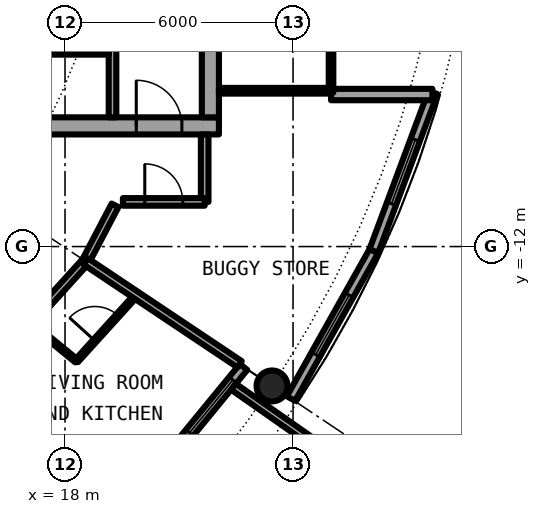
"""IFC4 building model, lengths in metres.
Left out: names, types, materials, properties, quantities, classifications, styles, units other than length and angle.
Written with IfcOpenShell. Run it as: python <this file> out.ifc"""

import sys

from ifc_helpers import new_model, si_unit, direction, frame, frame_2d, origin, origin_2d, place, context, subcontext, project, spatial, rectangle, hollow_circle, extrude, element, fill, save


model = new_model("IFC4")
c1 = context("Model", 3, precision=1e-05, world=origin(), true_north=direction((0.0, 1.0)))
c2 = subcontext(c1, "Body", "Model", "MODEL_VIEW")
j1 = project(units=[si_unit("LENGTHUNIT", "METRE"), si_unit("PLANEANGLEUNIT", "RADIAN")], contexts=[c1])
p1 = place(None, origin())
s1 = spatial("IfcSite", under=j1, at=p1, CompositionType="ELEMENT")
p2 = place(p1, origin())
s2 = spatial("IfcBuilding", under=s1, at=p2, CompositionType="ELEMENT")
p3 = place(p2, frame((0.0, 0.0, 212.7)))
s3 = spatial("IfcBuildingStorey", under=s2, at=p3, CompositionType="ELEMENT", Elevation=212.7)
p4 = place(p3, frame((23.448, -15.667, 0.0), z_axis=(0.0, 0.0, 1.0), x_axis=(1.0, 0.0, 0.0)))
e1 = element("IfcColumn", 1, at=p4, inside=s3, PredefinedType="COLUMN", context=c2, shape_type="SweptSolid", body=[
    extrude(hollow_circle(Radius=0.406, WallThickness=0.03, at=origin_2d()), origin(), (0.0, 0.0, 1.0), 3.05),
])
p5 = place(p3, frame((19.304, -19.304, 0.0), z_axis=(0.0, 0.0, 1.0), x_axis=(0.634382322723, 0.773019449054, 0.0)))
e2 = element("IfcWall", 2, at=p5, inside=s3, PredefinedType="SOLIDWALL", context=c2, shape_type="SweptSolid", body=[
    extrude(rectangle(XDim=5.352, YDim=0.25, at=frame_2d((2.676, 0.0))), origin(), (0.0, 0.0, 1.0), 2.7),
])
p6 = place(p5, frame((0.841, 0.0, 0.0)))
e3 = element("IfcOpeningElement", 3, at=p6, cuts=e2, PredefinedType="OPENING", context=c2, shape_type="SweptSolid", body=[
    extrude(rectangle(XDim=1.0, YDim=2.2, at=frame_2d((0.5, 1.1))), frame((0.0, 0.135, 0.0), z_axis=(0.0, -1.0, 0.0), x_axis=(1.0, 0.0, 0.0)), (0.0, 0.0, 1.0), 0.27),
])
p7 = place(p5, frame((3.111, 0.0, 0.3)))
e4 = element("IfcOpeningElement", 4, at=p7, cuts=e2, PredefinedType="OPENING", context=c2, shape_type="SweptSolid", body=[
    extrude(rectangle(XDim=1.8, YDim=2.1, at=frame_2d((0.9, 1.05))), frame((0.0, 0.135, 0.0), z_axis=(0.0, -1.0, 0.0), x_axis=(1.0, 0.0, 0.0)), (0.0, 0.0, 1.0), 0.27),
])
p8 = place(p3, frame((22.433, -15.688, -0.03), z_axis=(0.0, 0.0, 1.0), x_axis=(0.819373043115, -0.573260687834, 0.0)))
e5 = element("IfcWall", 5, at=p8, inside=s3, PredefinedType="SOLIDWALL", context=c2, shape_type="SweptSolid", body=[
    extrude(rectangle(XDim=2.925, YDim=0.2, at=frame_2d((1.463, 0.0))), origin(), (0.0, 0.0, 1.0), 2.73),
])
p9 = place(p3, frame((23.946, -16.0, 0.0), z_axis=(0.0, 0.0, 1.0), x_axis=(0.489696356642, 0.871893042919, 0.0)))
e6 = element("IfcWall", 6, at=p9, inside=s3, PredefinedType="SOLIDWALL", context=c2, shape_type="SweptSolid", body=[
    extrude(rectangle(XDim=4.454, YDim=0.25, at=frame_2d((2.227, 0.0))), origin(), (0.0, 0.0, 1.0), 2.7),
])
p10 = place(p9, frame((1.327, 0.0, 0.3)))
e7 = element("IfcOpeningElement", 7, at=p10, cuts=e6, PredefinedType="OPENING", context=c2, shape_type="SweptSolid", body=[
    extrude(rectangle(XDim=1.8, YDim=2.1, at=frame_2d((0.9, 1.05))), frame((0.0, 0.135, 0.0), z_axis=(0.0, -1.0, 0.0), x_axis=(1.0, 0.0, 0.0)), (0.0, 0.0, 1.0), 0.27),
])
p11 = place(p3, frame((26.127, -12.117, 0.0), z_axis=(0.0, 0.0, 1.0), x_axis=(0.349247811493, 0.937030397675, 0.0)))
e8 = element("IfcWall", 8, at=p11, inside=s3, PredefinedType="SOLIDWALL", context=c2, shape_type="SweptSolid", body=[
    extrude(rectangle(XDim=4.452, YDim=0.25, at=frame_2d((2.226, 0.0))), origin(), (0.0, 0.0, 1.0), 2.7),
])
p12 = place(p11, frame((1.327, 0.0, 0.3)))
e9 = element("IfcOpeningElement", 9, at=p12, cuts=e8, PredefinedType="OPENING", context=c2, shape_type="SweptSolid", body=[
    extrude(rectangle(XDim=1.8, YDim=2.1, at=frame_2d((0.9, 1.05))), frame((0.0, 0.135, 0.0), z_axis=(0.0, -1.0, 0.0), x_axis=(1.0, 0.0, 0.0)), (0.0, 0.0, 1.0), 0.27),
])
p13 = place(p3, frame((25.0, -8.0, 0.0), z_axis=(0.0, 0.0, 1.0), x_axis=(1.0, 0.0, 0.0)))
e10 = element("IfcWall", 10, at=p13, inside=s3, PredefinedType="SOLIDWALL", context=c2, shape_type="SweptSolid", body=[
    extrude(rectangle(XDim=2.667, YDim=0.3, at=frame_2d((1.333, 0.0))), origin(), (0.0, 0.0, 1.0), 2.7),
])
p14 = place(p3, frame((8.55, -8.825, 0.0), z_axis=(0.0, 0.0, 1.0), x_axis=(1.0, 0.0, 0.0)))
e11 = element("IfcWall", 11, at=p14, inside=s3, PredefinedType="SHEAR", context=c2, shape_type="SweptSolid", body=[
    extrude(rectangle(XDim=13.5, YDim=0.45, at=frame_2d((6.75, 0.0))), origin(), (0.0, 0.0, 1.0), 3.05),
])
p15 = place(p14, frame((11.325, 0.0, 0.0)))
e12 = element("IfcOpeningElement", 12, at=p15, cuts=e11, PredefinedType="OPENING", context=c2, shape_type="SweptSolid", body=[
    extrude(rectangle(XDim=1.2, YDim=2.3, at=frame_2d((0.6, 1.15))), frame((0.0, 0.235, 0.0), z_axis=(0.0, -1.0, 0.0), x_axis=(1.0, 0.0, 0.0)), (0.0, 0.0, 1.0), 0.47),
])
p16 = place(p3, frame((21.825, 8.6, 0.0), z_axis=(0.0, 0.0, 1.0), x_axis=(0.0, -1.0, 0.0)))
e13 = element("IfcWall", 13, at=p16, inside=s3, PredefinedType="SHEAR", context=c2, shape_type="SweptSolid", body=[
    extrude(rectangle(XDim=17.2, YDim=0.45, at=frame_2d((8.6, 0.0))), origin(), (0.0, 0.0, 1.0), 3.05),
])
p17 = place(p16, frame((7.7, 0.0, 0.0)))
e14 = element("IfcOpeningElement", 14, at=p17, cuts=e13, PredefinedType="OPENING", context=c2, shape_type="SweptSolid", body=[
    extrude(rectangle(XDim=1.8, YDim=2.3, at=frame_2d((0.9, 1.15))), frame((0.0, 0.235, 0.0), z_axis=(0.0, -1.0, 0.0), x_axis=(1.0, 0.0, 0.0)), (0.0, 0.0, 1.0), 0.47),
])
p18 = place(p3, frame((19.25, -8.6, 0.0), z_axis=(0.0, 0.0, 1.0), x_axis=(0.0, 1.0, 0.0)))
e15 = element("IfcWall", 15, at=p18, inside=s3, PredefinedType="SOLIDWALL", context=c2, shape_type="SweptSolid", body=[
    extrude(rectangle(XDim=7.025, YDim=0.2, at=frame_2d((3.513, 0.0))), origin(), (0.0, 0.0, 1.0), 2.7),
])
p19 = place(p18, frame((2.35, 0.0, 0.0)))
e16 = element("IfcOpeningElement", 16, at=p19, cuts=e15, PredefinedType="OPENING", context=c2, shape_type="SweptSolid", body=[
    extrude(rectangle(XDim=1.1, YDim=2.3, at=frame_2d((0.55, 1.15))), frame((0.0, 0.11, 0.0), z_axis=(0.0, -1.0, 0.0), x_axis=(1.0, 0.0, 0.0)), (0.0, 0.0, 1.0), 0.22),
])
p20 = place(p3, frame((15.45, -6.875, 0.0), z_axis=(0.0, 0.0, 1.0), x_axis=(1.0, 0.0, 0.0)))
e17 = element("IfcWall", 17, at=p20, inside=s3, PredefinedType="PARTITIONING", context=c2, shape_type="SweptSolid", body=[
    extrude(rectangle(XDim=3.7, YDim=0.15, at=frame_2d((1.85, 0.0))), origin(), (0.0, 0.0, 1.0), 2.7),
])
p21 = place(p20, frame((1.4, 0.0, 0.0)))
e18 = element("IfcOpeningElement", 18, at=p21, cuts=e17, PredefinedType="OPENING", context=c2, shape_type="SweptSolid", body=[
    extrude(rectangle(XDim=0.9, YDim=2.3, at=frame_2d((0.45, 1.15))), frame((0.0, 0.085, 0.0), z_axis=(0.0, -1.0, 0.0), x_axis=(1.0, 0.0, 0.0)), (0.0, 0.0, 1.0), 0.17),
])
p22 = place(p3, frame((22.05, -7.9, 0.0), z_axis=(0.0, 0.0, 1.0), x_axis=(1.0, 0.0, 0.0)))
e19 = element("IfcWall", 19, at=p22, inside=s3, PredefinedType="PARTITIONING", context=c2, shape_type="SweptSolid", body=[
    extrude(rectangle(XDim=2.89, YDim=0.15, at=frame_2d((1.445, 0.0))), origin(), (0.0, 0.0, 1.0), 2.7),
])
p23 = place(p3, frame((25.0, -7.95, 0.0), z_axis=(0.0, 0.0, 1.0), x_axis=(0.0, 1.0, 0.0)))
e20 = element("IfcWall", 20, at=p23, inside=s3, PredefinedType="PARTITIONING", context=c2, shape_type="SweptSolid", body=[
    extrude(rectangle(XDim=15.9, YDim=0.12, at=frame_2d((7.95, 0.0))), origin(), (0.0, 0.0, 1.0), 2.7),
])
p24 = place(p23, frame((0.95, 0.0, 0.1)))
e21 = element("IfcOpeningElement", 21, at=p24, cuts=e20, PredefinedType="OPENING", context=c2, shape_type="SweptSolid", body=[
    extrude(rectangle(XDim=14.0, YDim=2.35, at=frame_2d((7.0, 1.175))), frame((0.0, 0.07, 0.0), z_axis=(0.0, -1.0, 0.0), x_axis=(1.0, 0.0, 0.0)), (0.0, 0.0, 1.0), 0.14),
])
p25 = place(p3, frame((18.302, -15.01, 0.0), z_axis=(0.0, 0.0, 1.0), x_axis=(0.671637685376, 0.740879760544, 0.0)))
e22 = element("IfcWall", 22, at=p25, inside=s3, PredefinedType="PARTITIONING", context=c2, shape_type="SweptSolid", body=[
    extrude(rectangle(XDim=2.338, YDim=0.1, at=frame_2d((1.169, 0.0))), origin(), (0.0, 0.0, 1.0), 2.7),
])
p26 = place(p25, frame((0.719, 0.0, 0.0)))
e23 = element("IfcOpeningElement", 23, at=p26, cuts=e22, PredefinedType="OPENING", context=c2, shape_type="SweptSolid", body=[
    extrude(rectangle(XDim=0.9, YDim=2.3, at=frame_2d((0.45, 1.15))), frame((0.0, 0.06, 0.0), z_axis=(0.0, -1.0, 0.0), x_axis=(1.0, 0.0, 0.0)), (0.0, 0.0, 1.0), 0.12),
])
p27 = place(p3, frame((18.542, -12.389, 0.0), z_axis=(0.0, 0.0, 1.0), x_axis=(0.465359652486, 0.885121683068, 0.0)))
e24 = element("IfcWall", 24, at=p27, inside=s3, PredefinedType="PARTITIONING", context=c2, shape_type="SweptSolid", body=[
    extrude(rectangle(XDim=1.665, YDim=0.2, at=frame_2d((0.833, 0.0))), origin(), (0.0, 0.0, 1.0), 2.7),
])
p28 = place(p3, frame((14.147, -17.238, 0.0), z_axis=(0.0, 0.0, 1.0), x_axis=(0.671561669125, 0.740948665268, 0.0)))
e25 = element("IfcWall", 25, at=p28, inside=s3, PredefinedType="PARTITIONING", context=c2, shape_type="SweptSolid", body=[
    extrude(rectangle(XDim=6.544, YDim=0.2, at=frame_2d((3.272, 0.0))), origin(), (0.0, 0.0, 1.0), 2.7),
])
p29 = place(p28, frame((1.682, 0.0, 0.0)))
e26 = element("IfcOpeningElement", 26, at=p29, cuts=e25, PredefinedType="OPENING", context=c2, shape_type="SweptSolid", body=[
    extrude(rectangle(XDim=1.0, YDim=2.3, at=frame_2d((0.5, 1.15))), frame((0.0, 0.11, 0.0), z_axis=(0.0, -1.0, 0.0), x_axis=(1.0, 0.0, 0.0)), (0.0, 0.0, 1.0), 0.22),
])
p30 = place(p3, frame((21.675, -10.825, 0.0), z_axis=(0.0, 0.0, 1.0), x_axis=(0.0, 1.0, 0.0)))
e27 = element("IfcWall", 27, at=p30, inside=s3, PredefinedType="PARTITIONING", context=c2, shape_type="SweptSolid", body=[
    extrude(rectangle(XDim=1.775, YDim=0.2, at=frame_2d((0.887, 0.0))), origin(), (0.0, 0.0, 1.0), 2.7),
])
p31 = place(p3, frame((19.523, -10.825, 0.0), z_axis=(0.0, 0.0, 1.0), x_axis=(1.0, 0.0, 0.0)))
e28 = element("IfcWall", 28, at=p31, inside=s3, PredefinedType="PARTITIONING", context=c2, shape_type="SweptSolid", body=[
    extrude(rectangle(XDim=2.152, YDim=0.2, at=frame_2d((1.076, 0.0))), origin(), (0.0, 0.0, 1.0), 2.7),
])
p32 = place(p31, frame((0.576, 0.0, 0.0)))
e29 = element("IfcOpeningElement", 29, at=p32, cuts=e28, PredefinedType="OPENING", context=c2, shape_type="SweptSolid", body=[
    extrude(rectangle(XDim=1.0, YDim=2.3, at=frame_2d((0.5, 1.15))), frame((0.0, 0.11, 0.0), z_axis=(0.0, -1.0, 0.0), x_axis=(1.0, 0.0, 0.0)), (0.0, 0.0, 1.0), 0.22),
])
p33 = place(p3, frame((17.077, -14.006, 0.0), z_axis=(0.0, 0.0, 1.0), x_axis=(0.773476341377, -0.633825172528, 0.0)))
e30 = element("IfcWall", 30, at=p33, inside=s3, PredefinedType="PARTITIONING", context=c2, shape_type="SweptSolid", body=[
    extrude(rectangle(XDim=1.584, YDim=0.1, at=frame_2d((0.792, 0.0))), origin(), (0.0, 0.0, 1.0), 2.7),
])
p34 = place(p3, frame((16.732, -16.743, 0.0), z_axis=(0.0, 0.0, 1.0), x_axis=(0.706967463531, -0.707246071398, 0.0)))
e31 = element("IfcWall", 31, at=p34, inside=s3, PredefinedType="PARTITIONING", context=c2, shape_type="SweptSolid", body=[
    extrude(rectangle(XDim=3.505, YDim=0.1, at=frame_2d((1.752, 0.0))), origin(), (0.0, 0.0, 1.0), 2.7),
])
p35 = place(p34, frame((1.303, 0.0, 0.0)))
e32 = element("IfcOpeningElement", 32, at=p35, cuts=e31, PredefinedType="OPENING", context=c2, shape_type="SweptSolid", body=[
    extrude(rectangle(XDim=0.9, YDim=2.3, at=frame_2d((0.45, 1.15))), frame((0.0, 0.06, 0.0), z_axis=(0.0, -1.0, 0.0), x_axis=(1.0, 0.0, 0.0)), (0.0, 0.0, 1.0), 0.12),
])
p36 = place(p3, frame((18.542, -12.389, 0.0), z_axis=(0.0, 0.0, 1.0), x_axis=(0.831387096605, -0.55569370664, 0.0)))
e33 = element("IfcWall", 33, at=p36, inside=s3, PredefinedType="PARTITIONING", context=c2, shape_type="SweptSolid", body=[
    extrude(rectangle(XDim=4.875, YDim=0.2, at=frame_2d((2.438, 0.0))), origin(), (0.0, 0.0, 1.0), 2.7),
])
p37 = place(p7, origin())
e34 = element("IfcWindow", 34, at=p37, inside=s3, PartitioningType="SINGLE_PANEL", PredefinedType="WINDOW", context=c2, shape_type="SweptSolid", body=[
    extrude(rectangle(XDim=1.8, YDim=2.1, at=frame_2d((0.9, 1.05))), frame((0.0, 0.03, 0.0), z_axis=(0.0, -1.0, 0.0), x_axis=(1.0, 0.0, 0.0)), (0.0, 0.0, 1.0), 0.06),
])
fill(e4, e34)
p38 = place(p10, origin())
e35 = element("IfcWindow", 35, at=p38, inside=s3, PartitioningType="SINGLE_PANEL", PredefinedType="WINDOW", context=c2, shape_type="SweptSolid", body=[
    extrude(rectangle(XDim=1.8, YDim=2.1, at=frame_2d((0.9, 1.05))), frame((0.0, 0.03, 0.0), z_axis=(0.0, -1.0, 0.0), x_axis=(1.0, 0.0, 0.0)), (0.0, 0.0, 1.0), 0.06),
])
fill(e7, e35)
p39 = place(p12, origin())
e36 = element("IfcWindow", 36, at=p39, inside=s3, PartitioningType="SINGLE_PANEL", PredefinedType="WINDOW", context=c2, shape_type="SweptSolid", body=[
    extrude(rectangle(XDim=1.8, YDim=2.1, at=frame_2d((0.9, 1.05))), frame((0.0, 0.03, 0.0), z_axis=(0.0, -1.0, 0.0), x_axis=(1.0, 0.0, 0.0)), (0.0, 0.0, 1.0), 0.06),
])
fill(e9, e36)
p40 = place(p21, origin())
e37 = element("IfcDoor", 37, at=p40, inside=s3, OperationType="SINGLE_SWING_LEFT", PredefinedType="DOOR", context=c2, shape_type="SweptSolid", body=[
    extrude(rectangle(XDim=0.9, YDim=2.3, at=frame_2d((0.45, 1.15))), frame((0.0, 0.025, 0.0), z_axis=(0.0, -1.0, 0.0), x_axis=(1.0, 0.0, 0.0)), (0.0, 0.0, 1.0), 0.05),
])
fill(e18, e37)
p41 = place(p15, origin())
e38 = element("IfcDoor", 38, at=p41, inside=s3, OperationType="SINGLE_SWING_LEFT", PredefinedType="DOOR", context=c2, shape_type="SweptSolid", body=[
    extrude(rectangle(XDim=1.2, YDim=2.3, at=frame_2d((0.6, 1.15))), frame((0.0, 0.025, 0.0), z_axis=(0.0, -1.0, 0.0), x_axis=(1.0, 0.0, 0.0)), (0.0, 0.0, 1.0), 0.05),
])
fill(e12, e38)
p42 = place(p24, origin())
e39 = element("IfcWindow", 39, at=p42, inside=s3, PartitioningType="SINGLE_PANEL", PredefinedType="WINDOW", context=c2, shape_type="SweptSolid", body=[
    extrude(rectangle(XDim=14.0, YDim=2.35, at=frame_2d((7.0, 1.175))), frame((0.0, 0.03, 0.0), z_axis=(0.0, -1.0, 0.0), x_axis=(1.0, 0.0, 0.0)), (0.0, 0.0, 1.0), 0.06),
])
fill(e21, e39)
p43 = place(p26, origin())
e40 = element("IfcDoor", 40, at=p43, inside=s3, OperationType="SINGLE_SWING_LEFT", PredefinedType="DOOR", context=c2, shape_type="SweptSolid", body=[
    extrude(rectangle(XDim=0.9, YDim=2.3, at=frame_2d((0.45, 1.15))), frame((0.0, 0.025, 0.0), z_axis=(0.0, -1.0, 0.0), x_axis=(1.0, 0.0, 0.0)), (0.0, 0.0, 1.0), 0.05),
])
fill(e23, e40)
p44 = place(p32, origin())
e41 = element("IfcDoor", 41, at=p44, inside=s3, OperationType="SINGLE_SWING_LEFT", PredefinedType="DOOR", context=c2, shape_type="SweptSolid", body=[
    extrude(rectangle(XDim=1.0, YDim=2.3, at=frame_2d((0.5, 1.15))), frame((0.0, 0.025, 0.0), z_axis=(0.0, -1.0, 0.0), x_axis=(1.0, 0.0, 0.0)), (0.0, 0.0, 1.0), 0.05),
])
fill(e29, e41)
save(model, sys.argv[1])
